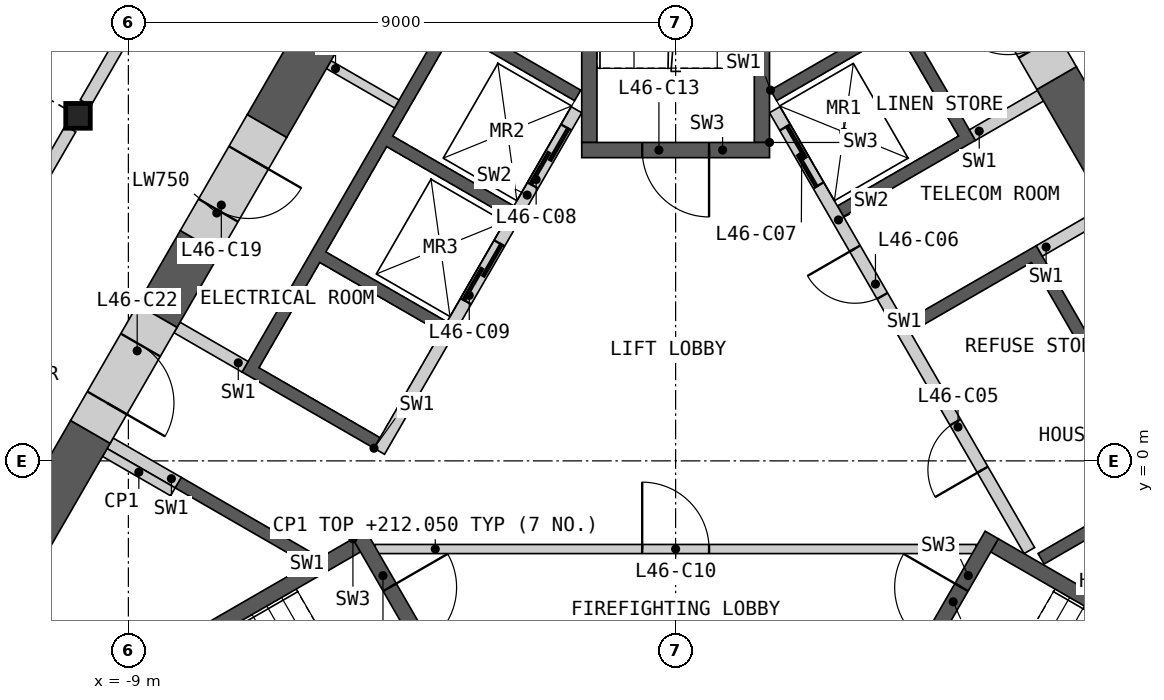
"""IFC4 building model, lengths in metres.
Left out: names, types, materials, properties, quantities, classifications, styles, units other than length and angle.
Written with IfcOpenShell. Run it as: python <this file> out.ifc"""

import sys

from ifc_helpers import new_model, si_unit, direction, frame, frame_2d, origin, origin_2d, place, context, subcontext, project, spatial, polyline, rectangle, i_section, outline, extrude, element, fill, save


model = new_model("IFC4")
c1 = context("Model", 3, precision=1e-05, world=origin(), true_north=direction((0.0, 1.0)))
c2 = subcontext(c1, "Body", "Model", "MODEL_VIEW")
j1 = project(units=[si_unit("LENGTHUNIT", "METRE"), si_unit("PLANEANGLEUNIT", "RADIAN")], contexts=[c1])
p1 = place(None, origin())
s1 = spatial("IfcSite", under=j1, at=p1, CompositionType="ELEMENT")
p2 = place(p1, origin())
s2 = spatial("IfcBuilding", under=s1, at=p2, CompositionType="ELEMENT")
p3 = place(p2, frame((0.0, 0.0, 208.8)))
s3 = spatial("IfcBuildingStorey", under=s2, at=p3, CompositionType="ELEMENT", Elevation=208.8)
p4 = place(p3, frame((-9.828, 5.675, 0.0), z_axis=(0.0, 0.0, 1.0), x_axis=(1.0, 0.0, 0.0)))
e1 = element("IfcColumn", 1, at=p4, inside=s3, PredefinedType="COLUMN", context=c2, shape_type="SweptSolid", body=[
    extrude(i_section(OverallWidth=0.404, OverallDepth=0.407, WebThickness=0.027, FlangeThickness=0.044, at=origin_2d()), origin(), (0.0, 0.0, 1.0), 3.6),
])
p5 = place(p3, origin())
e2 = element("IfcWall", 2, at=p5, inside=s3, PredefinedType="SHEAR", context=c2, shape_type="SweptSolid", body=[
    extrude(outline(polyline([(1.561, 6.097), (3.731, 7.35), (4.931, 5.272), (2.76, 4.019), (2.66, 4.192), (4.652, 5.342), (3.652, 7.074), (1.66, 5.924), (1.561, 6.097)])), origin(), (0.0, 0.0, 1.0), 3.25),
])
p6 = place(p3, origin())
e3 = element("IfcWall", 3, at=p6, inside=s3, PredefinedType="SHEAR", context=c2, shape_type="SweptSolid", body=[
    extrude(outline(polyline([(3.76, 2.287), (5.931, 3.54), (8.231, -0.444), (6.061, -1.697), (5.96, -1.524), (7.952, -0.374), (5.852, 3.263), (3.861, 2.113), (3.76, 2.287)])), origin(), (0.0, 0.0, 1.0), 3.25),
])
p7 = place(p3, frame((5.817, -1.476, 0.0), z_axis=(0.0, 0.0, 1.0), x_axis=(-0.500002616675, 0.866023893041, 0.0)))
e4 = element("IfcWall", 4, at=p7, inside=s3, PredefinedType="SOLIDWALL", context=c2, shape_type="SweptSolid", body=[
    extrude(rectangle(XDim=8.373, YDim=0.2, at=frame_2d((4.187, 0.0))), origin(), (0.0, 0.0, 1.0), 3.25),
])
p8 = place(p7, frame((1.537, 0.0, 0.0)))
e5 = element("IfcOpeningElement", 5, at=p8, cuts=e4, PredefinedType="OPENING", context=c2, shape_type="SweptSolid", body=[
    extrude(rectangle(XDim=0.9, YDim=2.1, at=frame_2d((0.45, 1.05))), frame((0.0, 0.11, 0.0), z_axis=(0.0, -1.0, 0.0), x_axis=(1.0, 0.0, 0.0)), (0.0, 0.0, 1.0), 0.22),
])
p9 = place(p7, frame((4.837, 0.0, 0.0)))
e6 = element("IfcOpeningElement", 6, at=p9, cuts=e4, PredefinedType="OPENING", context=c2, shape_type="SweptSolid", body=[
    extrude(rectangle(XDim=0.9, YDim=2.1, at=frame_2d((0.45, 1.05))), frame((0.0, 0.11, 0.0), z_axis=(0.0, -1.0, 0.0), x_axis=(1.0, 0.0, 0.0)), (0.0, 0.0, 1.0), 0.22),
])
p10 = place(p7, frame((6.937, 0.0, 0.0)))
e7 = element("IfcOpeningElement", 7, at=p10, cuts=e4, PredefinedType="OPENING", context=c2, shape_type="SweptSolid", body=[
    extrude(rectangle(XDim=1.1, YDim=2.1, at=frame_2d((0.55, 1.05))), frame((0.0, 0.11, 0.0), z_axis=(0.0, -1.0, 0.0), x_axis=(1.0, 0.0, 0.0)), (0.0, 0.0, 1.0), 0.22),
])
p11 = place(p3, frame((5.981, 3.453, 0.0), z_axis=(0.0, 0.0, 1.0), x_axis=(0.865968639725, 0.500098305348, 0.0)))
e8 = element("IfcWall", 8, at=p11, inside=s3, PredefinedType="SHEAR", context=c2, shape_type="SweptSolid", body=[
    extrude(rectangle(XDim=1.293, YDim=0.2, at=frame_2d((0.646, 0.0))), origin(), (0.0, 0.0, 1.0), 3.25),
])
p12 = place(p3, frame((4.881, 5.358, 0.0), z_axis=(0.0, 0.0, 1.0), x_axis=(0.866084958089, 0.499896834728, 0.0)))
e9 = element("IfcWall", 9, at=p12, inside=s3, PredefinedType="SHEAR", context=c2, shape_type="SweptSolid", body=[
    extrude(rectangle(XDim=1.293, YDim=0.2, at=frame_2d((0.646, 0.0))), origin(), (0.0, 0.0, 1.0), 3.25),
])
p13 = place(p3, origin())
e10 = element("IfcWall", 10, at=p13, inside=s3, PredefinedType="SHEAR", context=c2, shape_type="SweptSolid", body=[
    extrude(outline(polyline([(-6.061, -1.697), (-8.231, -0.444), (-8.131, -0.271), (-5.96, -1.524), (-6.061, -1.697)])), origin(), (0.0, 0.0, 1.0), 3.25),
])
p14 = place(p3, origin())
e11 = element("IfcWall", 11, at=p14, inside=s3, PredefinedType="SHEAR", context=c2, shape_type="SweptSolid", body=[
    extrude(outline(polyline([(-4.96, 0.208), (-7.131, 1.461), (-3.731, 7.35), (-1.561, 6.097), (-1.66, 5.924), (-3.652, 7.074), (-4.652, 5.342), (-2.66, 4.192), (-2.76, 4.019), (-4.752, 5.169), (-5.752, 3.437), (-3.76, 2.287), (-3.861, 2.113), (-5.852, 3.263), (-6.852, 1.531), (-4.861, 0.381), (-4.96, 0.208)])), origin(), (0.0, 0.0, 1.0), 3.25),
])
p15 = place(p3, frame((-1.631, 5.776, 0.0), z_axis=(0.0, 0.0, 1.0), x_axis=(-0.499992876559, -0.866029516466, 0.0)))
e12 = element("IfcWall", 12, at=p15, inside=s3, PredefinedType="SOLIDWALL", context=c2, shape_type="SweptSolid", body=[
    extrude(rectangle(XDim=6.486, YDim=0.2, at=frame_2d((3.243, 0.0))), origin(), (0.0, 0.0, 1.0), 3.25),
])
p16 = place(p15, frame((0.337, 0.0, 0.0)))
e13 = element("IfcOpeningElement", 13, at=p16, cuts=e12, PredefinedType="OPENING", context=c2, shape_type="SweptSolid", body=[
    extrude(rectangle(XDim=1.1, YDim=2.1, at=frame_2d((0.55, 1.05))), frame((0.0, 0.11, 0.0), z_axis=(0.0, -1.0, 0.0), x_axis=(1.0, 0.0, 0.0)), (0.0, 0.0, 1.0), 0.22),
])
p17 = place(p15, frame((2.537, 0.0, 0.0)))
e14 = element("IfcOpeningElement", 14, at=p17, cuts=e12, PredefinedType="OPENING", context=c2, shape_type="SweptSolid", body=[
    extrude(rectangle(XDim=1.1, YDim=2.1, at=frame_2d((0.55, 1.05))), frame((0.0, 0.11, 0.0), z_axis=(0.0, -1.0, 0.0), x_axis=(1.0, 0.0, 0.0)), (0.0, 0.0, 1.0), 0.22),
])
for number, where, z_axis, x_axis in (
    (15, (-7.081, 1.548, 0.0), (0.0, 0.0, 1.0), (-0.866, 0.5, 0.0)),
    (16, (-8.181, -0.357, 0.0), (0.0, 0.0, 1.0), (-0.866, 0.5, 0.0)),
):
    element("IfcWall", number, at=place(p3, frame(where, z_axis=z_axis, x_axis=x_axis)), inside=s3, PredefinedType="SHEAR", context=c2, shape_type="SweptSolid", body=[
        extrude(rectangle(XDim=1.293, YDim=0.2, at=frame_2d((0.646, 0.0))), origin(), (0.0, 0.0, 1.0), 3.25),
    ])
p18 = place(p3, frame((-4.941, -1.45, 0.0), z_axis=(0.0, 0.0, 1.0), x_axis=(1.0, 0.0, 0.0)))
e17 = element("IfcWall", 17, at=p18, inside=s3, PredefinedType="PARTITIONING", context=c2, shape_type="SweptSolid", body=[
    extrude(rectangle(XDim=9.882, YDim=0.15, at=frame_2d((4.941, 0.0))), origin(), (0.0, 0.0, 1.0), 3.25),
])
p19 = place(p18, frame((4.391, 0.0, 0.0)))
e18 = element("IfcOpeningElement", 18, at=p19, cuts=e17, PredefinedType="OPENING", context=c2, shape_type="SweptSolid", body=[
    extrude(rectangle(XDim=1.1, YDim=2.1, at=frame_2d((0.55, 1.05))), frame((0.0, 0.085, 0.0), z_axis=(0.0, -1.0, 0.0), x_axis=(1.0, 0.0, 0.0)), (0.0, 0.0, 1.0), 0.17),
])
p20 = place(p3, origin())
e19 = element("IfcWall", 19, at=p20, inside=s3, PredefinedType="SHEAR", context=c2, shape_type="SweptSolid", body=[
    extrude(outline(polyline([(-5.307, -1.281), (-10.374, -4.206), (-10.032, -4.298), (-5.182, -1.498), (-5.307, -1.281)])), origin(), (0.0, 0.0, 1.0), 3.25),
])
p21 = place(p3, frame((-5.199, -1.219, 0.0), z_axis=(0.0, 0.0, 1.0), x_axis=(0.499982516597, -0.866035497597, 0.0)))
e20 = element("IfcWall", 20, at=p21, inside=s3, PredefinedType="SHEAR", context=c2, shape_type="SweptSolid", body=[
    extrude(rectangle(XDim=3.088, YDim=0.25, at=frame_2d((1.544, 0.0))), origin(), (0.0, 0.0, 1.0), 3.25),
])
p22 = place(p21, frame((0.994, 0.0, 0.0)))
e21 = element("IfcOpeningElement", 21, at=p22, cuts=e20, PredefinedType="OPENING", context=c2, shape_type="SweptSolid", body=[
    extrude(rectangle(XDim=1.1, YDim=2.1, at=frame_2d((0.55, 1.05))), frame((0.0, 0.135, 0.0), z_axis=(0.0, -1.0, 0.0), x_axis=(1.0, 0.0, 0.0)), (0.0, 0.0, 1.0), 0.27),
])
p23 = place(p3, origin())
e22 = element("IfcWall", 22, at=p23, inside=s3, PredefinedType="SHEAR", context=c2, shape_type="SweptSolid", body=[
    extrude(outline(polyline([(10.032, -4.298), (10.374, -4.206), (5.307, -1.281), (5.182, -1.498), (10.032, -4.298)])), origin(), (0.0, 0.0, 1.0), 3.25),
])
p24 = place(p3, frame((3.655, -3.893, 0.0), z_axis=(0.0, 0.0, 1.0), x_axis=(0.499982516597, 0.866035497597, 0.0)))
e23 = element("IfcWall", 23, at=p24, inside=s3, PredefinedType="SHEAR", context=c2, shape_type="SweptSolid", body=[
    extrude(rectangle(XDim=3.088, YDim=0.25, at=frame_2d((1.544, 0.0))), origin(), (0.0, 0.0, 1.0), 3.25),
])
p25 = place(p24, frame((0.994, 0.0, 0.0)))
e24 = element("IfcOpeningElement", 24, at=p25, cuts=e23, PredefinedType="OPENING", context=c2, shape_type="SweptSolid", body=[
    extrude(rectangle(XDim=1.1, YDim=2.1, at=frame_2d((0.55, 1.05))), frame((0.0, 0.135, 0.0), z_axis=(0.0, -1.0, 0.0), x_axis=(1.0, 0.0, 0.0)), (0.0, 0.0, 1.0), 0.27),
])
p26 = place(p3, origin())
e25 = element("IfcWall", 25, at=p26, inside=s3, PredefinedType="SHEAR", context=c2, shape_type="SweptSolid", body=[
    extrude(outline(polyline([(1.544, 5.237), (1.544, 11.087), (1.294, 10.837), (1.294, 5.237), (1.544, 5.237)])), origin(), (0.0, 0.0, 1.0), 3.25),
])
p27 = place(p3, origin())
e26 = element("IfcWall", 26, at=p27, inside=s3, PredefinedType="SHEAR", context=c2, shape_type="SweptSolid", body=[
    extrude(outline(polyline([(-1.294, 10.837), (-1.544, 11.087), (-1.544, 5.237), (-1.294, 5.237), (-1.294, 10.837)])), origin(), (0.0, 0.0, 1.0), 3.25),
])
p28 = place(p3, frame((1.544, 5.112, 0.0), z_axis=(0.0, 0.0, 1.0), x_axis=(-1.0, 0.0, 0.0)))
e27 = element("IfcWall", 27, at=p28, inside=s3, PredefinedType="SHEAR", context=c2, shape_type="SweptSolid", body=[
    extrude(rectangle(XDim=3.088, YDim=0.25, at=frame_2d((1.544, 0.0))), origin(), (0.0, 0.0, 1.0), 3.25),
])
p29 = place(p28, frame((0.994, 0.0, 0.0)))
e28 = element("IfcOpeningElement", 28, at=p29, cuts=e27, PredefinedType="OPENING", context=c2, shape_type="SweptSolid", body=[
    extrude(rectangle(XDim=1.1, YDim=2.1, at=frame_2d((0.55, 1.05))), frame((0.0, 0.135, 0.0), z_axis=(0.0, -1.0, 0.0), x_axis=(1.0, 0.0, 0.0)), (0.0, 0.0, 1.0), 0.27),
])
for number, where, z_axis, x_axis in (
    (29, (-8.268, -0.509, 0.0), (0.0, 0.0, 1.0), (-0.866, 0.5, 0.0)),
    (30, (-5.705, 6.516, 0.0), (0.0, 0.0, 1.0), (0.866, -0.5, 0.0)),
):
    element("IfcWall", number, at=place(p3, frame(where, z_axis=z_axis, x_axis=x_axis)), inside=s3, PredefinedType="PARTITIONING", context=c2, shape_type="SweptSolid", body=[
        extrude(rectangle(XDim=1.293, YDim=0.15, at=frame_2d((0.646, 0.0))), origin(), (0.0, 0.0, 1.0), 3.25),
    ])
p30 = place(p3, frame((8.025, 3.248, 0.0), z_axis=(0.0, 0.0, 1.0), x_axis=(-0.499958618571, 0.866049294045, 0.0)))
e31 = element("IfcWall", 31, at=p30, inside=s3, PredefinedType="SHEAR", context=c2, shape_type="SweptSolid", body=[
    extrude(rectangle(XDim=3.52, YDim=0.75, at=frame_2d((1.76, 0.0))), origin(), (0.0, 0.0, 1.0), 3.25),
])
p31 = place(p3, frame((-9.625, 0.477, 0.0), z_axis=(0.0, 0.0, 1.0), x_axis=(-0.499986234705, -0.866033351035, 0.0)))
e32 = element("IfcWall", 32, at=p31, inside=s3, PredefinedType="SHEAR", context=c2, shape_type="SweptSolid", body=[
    extrude(rectangle(XDim=9.801, YDim=0.75, at=frame_2d((4.9, 0.0))), origin(), (0.0, 0.0, 1.0), 3.25),
])
p32 = place(p3, frame((-3.708, 10.724, 0.0), z_axis=(0.0, 0.0, 1.0), x_axis=(-0.500021737671, -0.866012853171, 0.0)))
e33 = element("IfcWall", 33, at=p32, inside=s3, PredefinedType="SHEAR", context=c2, shape_type="SweptSolid", body=[
    extrude(rectangle(XDim=6.026, YDim=0.75, at=frame_2d((3.013, 0.0))), origin(), (0.0, 0.0, 1.0), 3.25),
])
p33 = place(p3, frame((-7.821, 3.601, 0.0), z_axis=(0.0, 0.0, 1.0), x_axis=(-0.49996263964, -0.866046972724, 0.0)))
e34 = element("IfcWall", 34, at=p33, inside=s3, PredefinedType="SHEAR", context=c2, shape_type="SweptSolid", body=[
    extrude(rectangle(XDim=1.408, YDim=0.75, at=frame_2d((0.704, 0.0))), origin(), (0.0, 0.0, 1.0), 3.25),
])
p34 = place(p3, frame((-6.721, 5.506, 0.0), z_axis=(0.0, 0.0, 1.0), x_axis=(-0.499946605688, -0.86605622881, 0.0)))
e35 = element("IfcWall", 35, at=p34, inside=s3, PredefinedType="SHEAR", context=c2, shape_type="SweptSolid", body=[
    extrude(rectangle(XDim=2.2, YDim=0.75, at=frame_2d((1.1, 0.0))), origin(), (0.0, 0.0, 1.0), 3.25),
])
p35 = place(p34, frame((0.6, 0.0, 0.0)))
e36 = element("IfcOpeningElement", 36, at=p35, cuts=e35, PredefinedType="OPENING", context=c2, shape_type="SweptSolid", body=[
    extrude(rectangle(XDim=1.0, YDim=2.1, at=frame_2d((0.5, 1.05))), frame((0.0, 0.385, 0.0), z_axis=(0.0, -1.0, 0.0), x_axis=(1.0, 0.0, 0.0)), (0.0, 0.0, 1.0), 0.77),
])
p36 = place(p3, frame((6.265, 6.296, 0.0), z_axis=(0.0, 0.0, 1.0), x_axis=(-0.500029011134, 0.866008653551, 0.0)))
e37 = element("IfcWall", 37, at=p36, inside=s3, PredefinedType="SHEAR", context=c2, shape_type="SweptSolid", body=[
    extrude(rectangle(XDim=2.16, YDim=0.75, at=frame_2d((1.08, 0.0))), origin(), (0.0, 0.0, 1.0), 3.25),
])
p37 = place(p36, frame((0.6, 0.0, 0.0)))
e38 = element("IfcOpeningElement", 38, at=p37, cuts=e37, PredefinedType="OPENING", context=c2, shape_type="SweptSolid", body=[
    extrude(rectangle(XDim=1.0, YDim=2.1, at=frame_2d((0.5, 1.05))), frame((0.0, 0.385, 0.0), z_axis=(0.0, -1.0, 0.0), x_axis=(1.0, 0.0, 0.0)), (0.0, 0.0, 1.0), 0.77),
])
p38 = place(p3, frame((-8.525, 2.382, 0.0), z_axis=(0.0, 0.0, 1.0), x_axis=(-0.500077893725, -0.86598042715, 0.0)))
e39 = element("IfcWall", 39, at=p38, inside=s3, PredefinedType="SHEAR", context=c2, shape_type="SweptSolid", body=[
    extrude(rectangle(XDim=2.2, YDim=0.75, at=frame_2d((1.1, 0.0))), origin(), (0.0, 0.0, 1.0), 3.25),
])
p39 = place(p38, frame((0.55, 0.0, 0.0)))
e40 = element("IfcOpeningElement", 40, at=p39, cuts=e39, PredefinedType="OPENING", context=c2, shape_type="SweptSolid", body=[
    extrude(rectangle(XDim=1.1, YDim=2.1, at=frame_2d((0.55, 1.05))), frame((0.0, 0.385, 0.0), z_axis=(0.0, -1.0, 0.0), x_axis=(1.0, 0.0, 0.0)), (0.0, 0.0, 1.0), 0.77),
])
p40 = place(p3, frame((5.377, 19.385, 0.0), z_axis=(0.0, 0.0, 1.0), x_axis=(0.500000757641, -0.86602496636, 0.0)))
e41 = element("IfcWall", 41, at=p40, inside=s3, PredefinedType="PARTITIONING", context=c2, shape_type="SweptSolid", body=[
    extrude(rectangle(XDim=28.198, YDim=0.2, at=frame_2d((14.099, 0.0))), origin(), (0.0, 0.0, 1.0), 3.25),
])
p41 = place(p40, frame((25.345, 0.0, 0.0)))
e42 = element("IfcOpeningElement", 42, at=p41, cuts=e41, PredefinedType="OPENING", context=c2, shape_type="SweptSolid", body=[
    extrude(rectangle(XDim=1.8, YDim=2.1, at=frame_2d((0.9, 1.05))), frame((0.0, 0.11, 0.0), z_axis=(0.0, -1.0, 0.0), x_axis=(1.0, 0.0, 0.0)), (0.0, 0.0, 1.0), 0.22),
])
p42 = place(p40, frame((19.621, 0.0, 0.0)))
e43 = element("IfcOpeningElement", 43, at=p42, cuts=e41, PredefinedType="OPENING", context=c2, shape_type="SweptSolid", body=[
    extrude(rectangle(XDim=1.0, YDim=2.1, at=frame_2d((0.5, 1.05))), frame((0.0, 0.11, 0.0), z_axis=(0.0, -1.0, 0.0), x_axis=(1.0, 0.0, 0.0)), (0.0, 0.0, 1.0), 0.22),
])
p43 = place(p40, frame((16.409, 0.0, 0.0)))
e44 = element("IfcOpeningElement", 44, at=p43, cuts=e41, PredefinedType="OPENING", context=c2, shape_type="SweptSolid", body=[
    extrude(rectangle(XDim=1.1, YDim=2.1, at=frame_2d((0.55, 1.05))), frame((0.0, 0.11, 0.0), z_axis=(0.0, -1.0, 0.0), x_axis=(1.0, 0.0, 0.0)), (0.0, 0.0, 1.0), 0.22),
])
p44 = place(p40, frame((1.452, 0.0, 0.0)))
e45 = element("IfcOpeningElement", 45, at=p44, cuts=e41, PredefinedType="OPENING", context=c2, shape_type="SweptSolid", body=[
    extrude(rectangle(XDim=0.95, YDim=2.1, at=frame_2d((0.475, 1.05))), frame((0.0, 0.11, 0.0), z_axis=(0.0, -1.0, 0.0), x_axis=(1.0, 0.0, 0.0)), (0.0, 0.0, 1.0), 0.22),
])
p45 = place(p3, frame((-9.705, 5.888, 0.0), z_axis=(0.0, 0.0, 1.0), x_axis=(0.50000393355, 0.866023132736, 0.0)))
e46 = element("IfcWall", 46, at=p45, inside=s3, PredefinedType="PARTITIONING", context=c2, shape_type="SweptSolid", body=[
    extrude(rectangle(XDim=9.335, YDim=0.2, at=frame_2d((4.667, 0.0))), origin(), (0.0, 0.0, 1.0), 3.25),
])
p46 = place(p45, frame((3.465, 0.0, 0.0)))
e47 = element("IfcOpeningElement", 47, at=p46, cuts=e46, PredefinedType="OPENING", context=c2, shape_type="SweptSolid", body=[
    extrude(rectangle(XDim=1.1, YDim=2.1, at=frame_2d((0.55, 1.05))), frame((0.0, 0.11, 0.0), z_axis=(0.0, -1.0, 0.0), x_axis=(1.0, 0.0, 0.0)), (0.0, 0.0, 1.0), 0.22),
])
p47 = place(p3, frame((-14.619, -2.624, 0.0), z_axis=(0.0, 0.0, 1.0), x_axis=(0.50000393355, 0.866023132736, 0.0)))
e48 = element("IfcWall", 48, at=p47, inside=s3, PredefinedType="PARTITIONING", context=c2, shape_type="SweptSolid", body=[
    extrude(rectangle(XDim=9.335, YDim=0.2, at=frame_2d((4.667, 0.0))), origin(), (0.0, 0.0, 1.0), 3.25),
])
p48 = place(p47, frame((3.062, 0.0, 0.0)))
e49 = element("IfcOpeningElement", 49, at=p48, cuts=e48, PredefinedType="OPENING", context=c2, shape_type="SweptSolid", body=[
    extrude(rectangle(XDim=1.0, YDim=2.1, at=frame_2d((0.5, 1.05))), frame((0.0, 0.11, 0.0), z_axis=(0.0, -1.0, 0.0), x_axis=(1.0, 0.0, 0.0)), (0.0, 0.0, 1.0), 0.22),
])
p49 = place(p8, origin())
e50 = element("IfcDoor", 50, at=p49, inside=s3, OperationType="SINGLE_SWING_LEFT", PredefinedType="DOOR", context=c2, shape_type="SweptSolid", body=[
    extrude(rectangle(XDim=0.9, YDim=2.1, at=frame_2d((0.45, 1.05))), frame((0.0, 0.025, 0.0), z_axis=(0.0, -1.0, 0.0), x_axis=(1.0, 0.0, 0.0)), (0.0, 0.0, 1.0), 0.05),
])
fill(e5, e50)
p50 = place(p9, origin())
e51 = element("IfcDoor", 51, at=p50, inside=s3, OperationType="SINGLE_SWING_RIGHT", PredefinedType="DOOR", context=c2, shape_type="SweptSolid", body=[
    extrude(rectangle(XDim=0.9, YDim=2.1, at=frame_2d((0.45, 1.05))), frame((0.0, 0.025, 0.0), z_axis=(0.0, -1.0, 0.0), x_axis=(1.0, 0.0, 0.0)), (0.0, 0.0, 1.0), 0.05),
])
fill(e6, e51)
p51 = place(p10, origin())
e52 = element("IfcDoor", 52, at=p51, inside=s3, OperationType="SLIDING_TO_LEFT", PredefinedType="DOOR", context=c2, shape_type="SweptSolid", body=[
    extrude(rectangle(XDim=1.1, YDim=2.1, at=frame_2d((0.55, 1.05))), frame((0.0, 0.025, 0.0), z_axis=(0.0, -1.0, 0.0), x_axis=(1.0, 0.0, 0.0)), (0.0, 0.0, 1.0), 0.05),
])
fill(e7, e52)
p52 = place(p16, origin())
e53 = element("IfcDoor", 53, at=p52, inside=s3, OperationType="SLIDING_TO_LEFT", PredefinedType="DOOR", context=c2, shape_type="SweptSolid", body=[
    extrude(rectangle(XDim=1.1, YDim=2.1, at=frame_2d((0.55, 1.05))), frame((0.0, 0.025, 0.0), z_axis=(0.0, -1.0, 0.0), x_axis=(1.0, 0.0, 0.0)), (0.0, 0.0, 1.0), 0.05),
])
fill(e13, e53)
p53 = place(p17, origin())
e54 = element("IfcDoor", 54, at=p53, inside=s3, OperationType="SLIDING_TO_LEFT", PredefinedType="DOOR", context=c2, shape_type="SweptSolid", body=[
    extrude(rectangle(XDim=1.1, YDim=2.1, at=frame_2d((0.55, 1.05))), frame((0.0, 0.025, 0.0), z_axis=(0.0, -1.0, 0.0), x_axis=(1.0, 0.0, 0.0)), (0.0, 0.0, 1.0), 0.05),
])
fill(e14, e54)
p54 = place(p19, origin())
e55 = element("IfcDoor", 55, at=p54, inside=s3, OperationType="SINGLE_SWING_LEFT", PredefinedType="DOOR", context=c2, shape_type="SweptSolid", body=[
    extrude(rectangle(XDim=1.1, YDim=2.1, at=frame_2d((0.55, 1.05))), frame((0.0, 0.025, 0.0), z_axis=(0.0, -1.0, 0.0), x_axis=(1.0, 0.0, 0.0)), (0.0, 0.0, 1.0), 0.05),
])
fill(e18, e55)
p55 = place(p22, origin())
e56 = element("IfcDoor", 56, at=p55, inside=s3, OperationType="SINGLE_SWING_LEFT", PredefinedType="DOOR", context=c2, shape_type="SweptSolid", body=[
    extrude(rectangle(XDim=1.1, YDim=2.1, at=frame_2d((0.55, 1.05))), frame((0.0, 0.025, 0.0), z_axis=(0.0, -1.0, 0.0), x_axis=(1.0, 0.0, 0.0)), (0.0, 0.0, 1.0), 0.05),
])
fill(e21, e56)
p56 = place(p25, origin())
e57 = element("IfcDoor", 57, at=p56, inside=s3, OperationType="SINGLE_SWING_RIGHT", PredefinedType="DOOR", context=c2, shape_type="SweptSolid", body=[
    extrude(rectangle(XDim=1.1, YDim=2.1, at=frame_2d((0.55, 1.05))), frame((0.0, 0.025, 0.0), z_axis=(0.0, -1.0, 0.0), x_axis=(1.0, 0.0, 0.0)), (0.0, 0.0, 1.0), 0.05),
])
fill(e24, e57)
p57 = place(p29, origin())
e58 = element("IfcDoor", 58, at=p57, inside=s3, OperationType="SINGLE_SWING_LEFT", PredefinedType="DOOR", context=c2, shape_type="SweptSolid", body=[
    extrude(rectangle(XDim=1.1, YDim=2.1, at=frame_2d((0.55, 1.05))), frame((0.0, 0.025, 0.0), z_axis=(0.0, -1.0, 0.0), x_axis=(1.0, 0.0, 0.0)), (0.0, 0.0, 1.0), 0.05),
])
fill(e28, e58)
p58 = place(p35, origin())
e59 = element("IfcDoor", 59, at=p58, inside=s3, OperationType="SINGLE_SWING_LEFT", PredefinedType="DOOR", context=c2, shape_type="SweptSolid", body=[
    extrude(rectangle(XDim=1.0, YDim=2.1, at=frame_2d((0.5, 1.05))), frame((0.0, 0.13, 0.0), z_axis=(0.0, -1.0, 0.0), x_axis=(1.0, 0.0, 0.0)), (0.0, 0.0, 1.0), 0.05),
])
fill(e36, e59)
p59 = place(p39, origin())
e60 = element("IfcDoor", 60, at=p59, inside=s3, OperationType="SINGLE_SWING_RIGHT", PredefinedType="DOOR", context=c2, shape_type="SweptSolid", body=[
    extrude(rectangle(XDim=1.1, YDim=2.1, at=frame_2d((0.55, 1.05))), frame((0.0, 0.13, 0.0), z_axis=(0.0, -1.0, 0.0), x_axis=(1.0, 0.0, 0.0)), (0.0, 0.0, 1.0), 0.05),
])
fill(e40, e60)
save(model, sys.argv[1])
